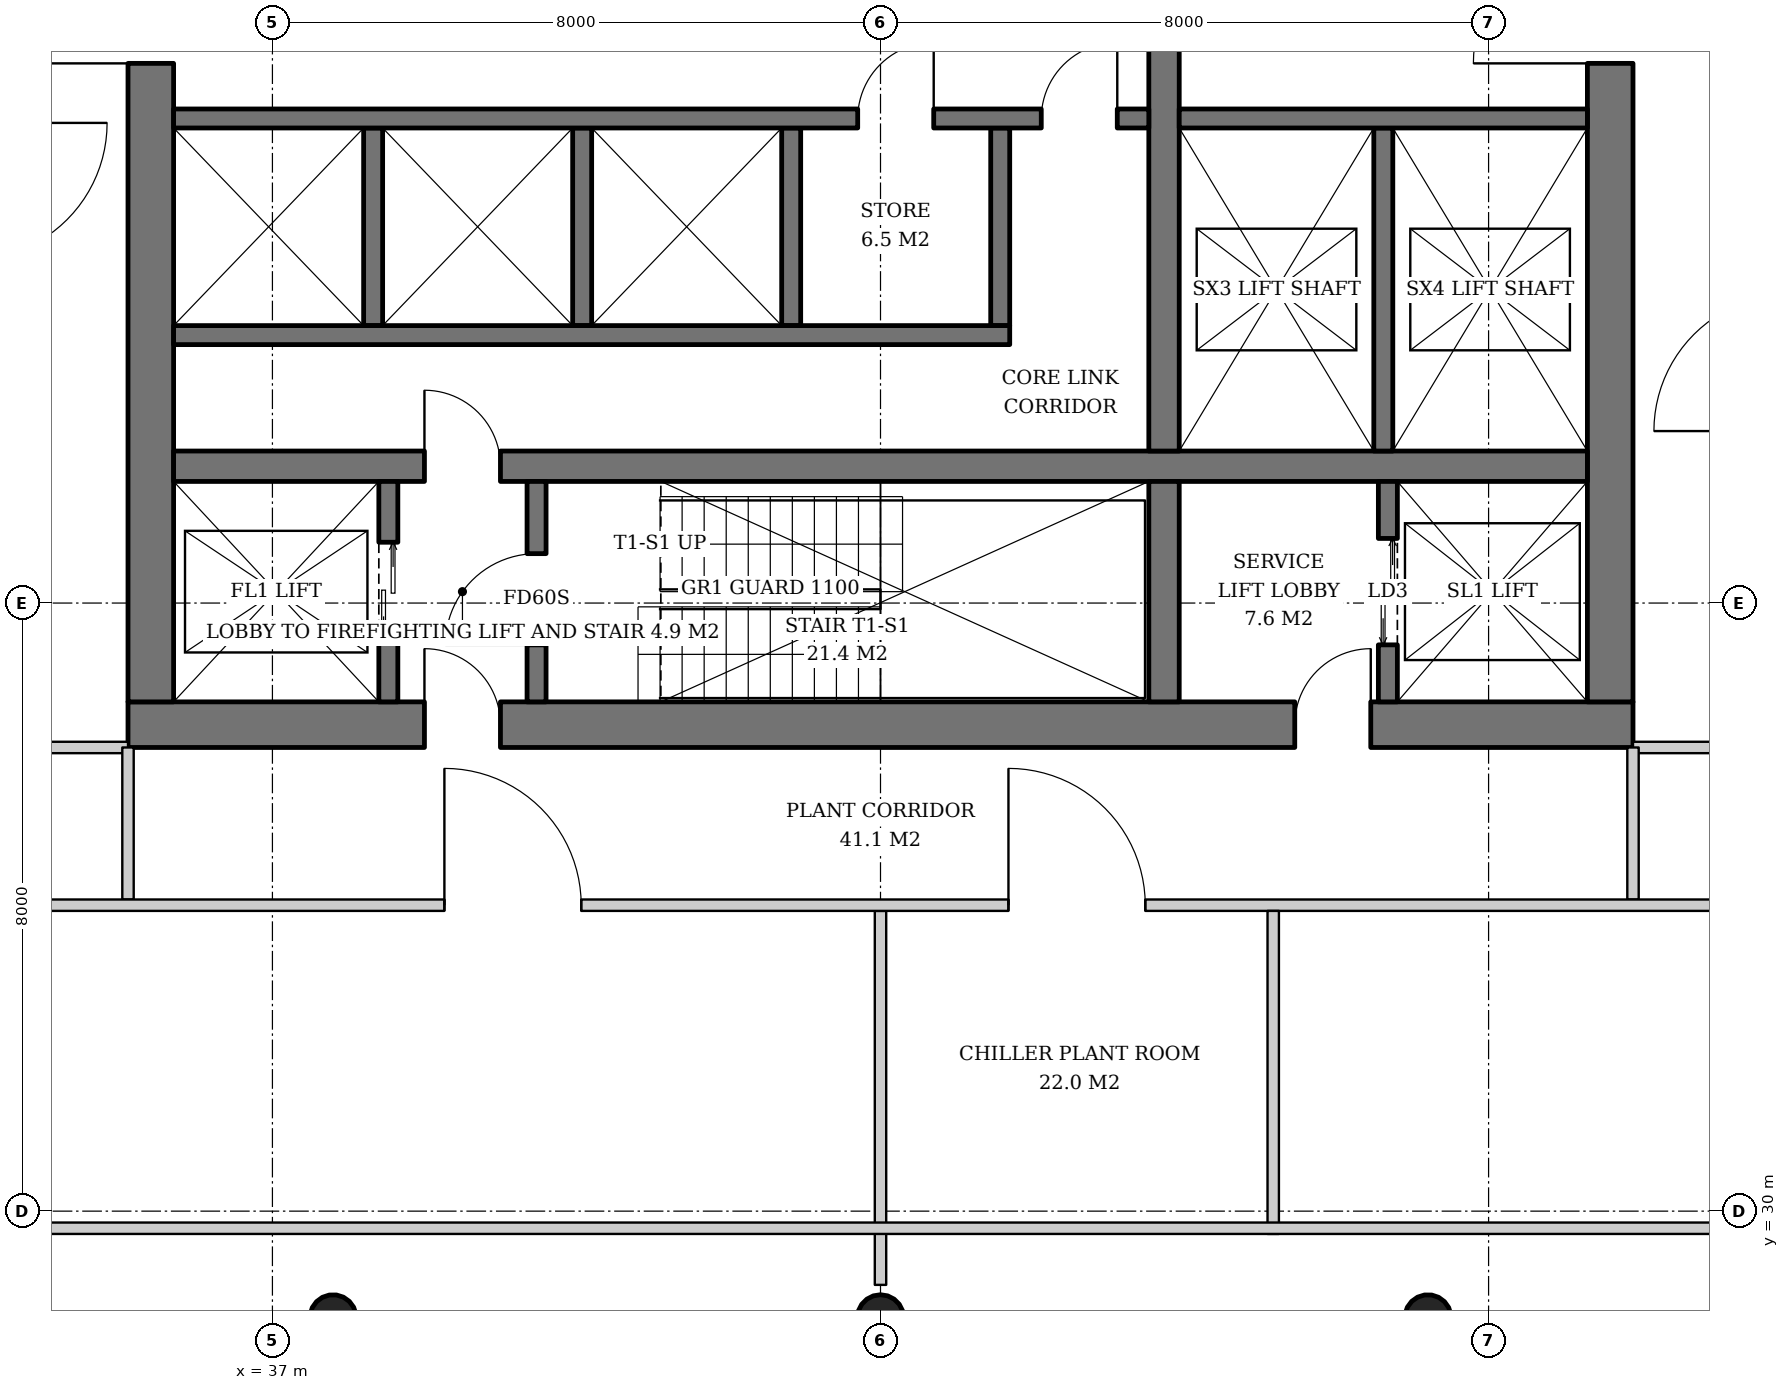
"""IFC4 building model, lengths in metres.
Left out: names, types, materials, properties, quantities, classifications, styles, units other than length and angle.
Written with IfcOpenShell. Run it as: python <this file> out.ifc"""

import sys

from ifc_helpers import new_model, si_unit, direction, frame, frame_2d, origin, origin_2d, place, context, subcontext, project, spatial, rectangle, hollow_circle, extrude, element, fill, save


model = new_model("IFC4")
c1 = context("Model", 3, precision=1e-05, world=origin(), true_north=direction((0.0, 1.0)))
c2 = subcontext(c1, "Body", "Model", "MODEL_VIEW")
j1 = project(units=[si_unit("LENGTHUNIT", "METRE"), si_unit("PLANEANGLEUNIT", "RADIAN")], contexts=[c1])
p1 = place(None, origin())
s1 = spatial("IfcSite", under=j1, at=p1, CompositionType="ELEMENT")
p2 = place(p1, origin())
s2 = spatial("IfcBuilding", under=s1, at=p2, CompositionType="ELEMENT")
p3 = place(p2, frame((0.0, 0.0, 226.2)))
s3 = spatial("IfcBuildingStorey", under=s2, at=p3, CompositionType="ELEMENT", Elevation=226.2)
p4 = place(p3, frame((37.779, 28.557, 0.0), z_axis=(0.015987237665, 0.031910269556, 0.999362868496), x_axis=(-0.894067115991, 0.447933021895, 0.0)))
e1 = element("IfcColumn", 1, at=p4, inside=s3, PredefinedType="COLUMN", context=c2, shape_type="SweptSolid", body=[
    extrude(hollow_circle(Radius=0.305, WallThickness=0.025, at=origin_2d()), origin(), (0.0, 0.0, 1.0), 3.802),
])
p5 = place(p3, frame((45.0, 28.557, 0.0), z_axis=(0.0, 0.031914348339, 0.999490607445), x_axis=(-1.0, 0.0, 0.0)))
e2 = element("IfcColumn", 2, at=p5, inside=s3, PredefinedType="COLUMN", context=c2, shape_type="SweptSolid", body=[
    extrude(hollow_circle(Radius=0.305, WallThickness=0.025, at=origin_2d()), origin(), (0.0, 0.0, 1.0), 3.802),
])
p6 = place(p3, frame((52.221, 28.557, 0.0), z_axis=(-0.015987237665, 0.031910269556, 0.999362868496), x_axis=(-0.894067115991, -0.447933021895, 0.0)))
e3 = element("IfcColumn", 3, at=p6, inside=s3, PredefinedType="COLUMN", context=c2, shape_type="SweptSolid", body=[
    extrude(hollow_circle(Radius=0.305, WallThickness=0.025, at=origin_2d()), origin(), (0.0, 0.0, 1.0), 3.802),
])
p7 = place(p3, frame((35.1, 36.4, 0.0), z_axis=(0.0, 0.0, 1.0), x_axis=(1.0, 0.0, 0.0)))
e4 = element("IfcWall", 4, at=p7, inside=s3, PredefinedType="SHEAR", context=c2, shape_type="SweptSolid", body=[
    extrude(rectangle(XDim=19.8, YDim=0.6, at=frame_2d((9.9, 0.0))), origin(), (0.0, 0.0, 1.0), 3.8),
])
p8 = place(p7, frame((3.9, 0.0, 0.0)))
e5 = element("IfcOpeningElement", 5, at=p8, cuts=e4, PredefinedType="OPENING", context=c2, shape_type="SweptSolid", body=[
    extrude(rectangle(XDim=1.0, YDim=2.1, at=frame_2d((0.5, 1.05))), frame((0.0, 0.31, 0.0), z_axis=(0.0, -1.0, 0.0), x_axis=(1.0, 0.0, 0.0)), (0.0, 0.0, 1.0), 0.62),
])
p9 = place(p7, frame((15.35, 0.0, 0.0)))
e6 = element("IfcOpeningElement", 6, at=p9, cuts=e4, PredefinedType="OPENING", context=c2, shape_type="SweptSolid", body=[
    extrude(rectangle(XDim=1.0, YDim=2.1, at=frame_2d((0.5, 1.05))), frame((0.0, 0.31, 0.0), z_axis=(0.0, -1.0, 0.0), x_axis=(1.0, 0.0, 0.0)), (0.0, 0.0, 1.0), 0.62),
])
p10 = place(p3, frame((35.4, 36.7, 0.0), z_axis=(0.0, 0.0, 1.0), x_axis=(0.0, 1.0, 0.0)))
e7 = element("IfcWall", 7, at=p10, inside=s3, PredefinedType="SHEAR", context=c2, shape_type="SweptSolid", body=[
    extrude(rectangle(XDim=18.6, YDim=0.6, at=frame_2d((9.3, 0.0))), origin(), (0.0, 0.0, 1.0), 3.8),
])
p11 = place(p10, frame((8.4, 0.0, 0.0)))
e8 = element("IfcOpeningElement", 8, at=p11, cuts=e7, PredefinedType="OPENING", context=c2, shape_type="SweptSolid", body=[
    extrude(rectangle(XDim=1.8, YDim=2.4, at=frame_2d((0.9, 1.2))), frame((0.0, 0.31, 0.0), z_axis=(0.0, -1.0, 0.0), x_axis=(1.0, 0.0, 0.0)), (0.0, 0.0, 1.0), 0.62),
])
p12 = place(p3, frame((54.6, 36.7, 0.0), z_axis=(0.0, 0.0, 1.0), x_axis=(0.0, 1.0, 0.0)))
e9 = element("IfcWall", 9, at=p12, inside=s3, PredefinedType="SHEAR", context=c2, shape_type="SweptSolid", body=[
    extrude(rectangle(XDim=18.6, YDim=0.6, at=frame_2d((9.3, 0.0))), origin(), (0.0, 0.0, 1.0), 3.8),
])
p13 = place(p12, frame((8.4, 0.0, 0.0)))
e10 = element("IfcOpeningElement", 10, at=p13, cuts=e9, PredefinedType="OPENING", context=c2, shape_type="SweptSolid", body=[
    extrude(rectangle(XDim=1.8, YDim=2.4, at=frame_2d((0.9, 1.2))), frame((0.0, 0.31, 0.0), z_axis=(0.0, -1.0, 0.0), x_axis=(1.0, 0.0, 0.0)), (0.0, 0.0, 1.0), 0.62),
])
p14 = place(p3, frame((35.7, 39.8, 0.0), z_axis=(0.0, 0.0, 1.0), x_axis=(1.0, 0.0, 0.0)))
e11 = element("IfcWall", 11, at=p14, inside=s3, PredefinedType="SHEAR", context=c2, shape_type="SweptSolid", body=[
    extrude(rectangle(XDim=18.6, YDim=0.4, at=frame_2d((9.3, 0.0))), origin(), (0.0, 0.0, 1.0), 3.8),
])
p15 = place(p14, frame((3.3, 0.0, 0.0)))
e12 = element("IfcOpeningElement", 12, at=p15, cuts=e11, PredefinedType="OPENING", context=c2, shape_type="SweptSolid", body=[
    extrude(rectangle(XDim=1.0, YDim=2.1, at=frame_2d((0.5, 1.05))), frame((0.0, 0.21, 0.0), z_axis=(0.0, -1.0, 0.0), x_axis=(1.0, 0.0, 0.0)), (0.0, 0.0, 1.0), 0.42),
])
p16 = place(p3, frame((48.73, 36.7, 0.0), z_axis=(0.0, 0.0, 1.0), x_axis=(0.0, 1.0, 0.0)))
e13 = element("IfcWall", 13, at=p16, inside=s3, PredefinedType="SHEAR", context=c2, shape_type="SweptSolid", body=[
    extrude(rectangle(XDim=2.9, YDim=0.4, at=frame_2d((1.45, 0.0))), origin(), (0.0, 0.0, 1.0), 3.8),
])
p17 = place(p3, frame((48.73, 40.0, 0.0), z_axis=(0.0, 0.0, 1.0), x_axis=(0.0, 1.0, 0.0)))
e14 = element("IfcWall", 14, at=p17, inside=s3, PredefinedType="SHEAR", context=c2, shape_type="SweptSolid", body=[
    extrude(rectangle(XDim=12.0, YDim=0.4, at=frame_2d((6.0, 0.0))), origin(), (0.0, 0.0, 1.0), 3.8),
])
p18 = place(p17, frame((5.5, 0.0, 0.0)))
e15 = element("IfcOpeningElement", 15, at=p18, cuts=e14, PredefinedType="OPENING", context=c2, shape_type="SweptSolid", body=[
    extrude(rectangle(XDim=1.0, YDim=2.1, at=frame_2d((0.5, 1.05))), frame((0.0, 0.21, 0.0), z_axis=(0.0, -1.0, 0.0), x_axis=(1.0, 0.0, 0.0)), (0.0, 0.0, 1.0), 0.42),
])
p19 = place(p3, frame((38.525, 36.7, 0.0), z_axis=(0.0, 0.0, 1.0), x_axis=(0.0, 1.0, 0.0)))
e16 = element("IfcWall", 16, at=p19, inside=s3, PredefinedType="SHEAR", context=c2, shape_type="SweptSolid", body=[
    extrude(rectangle(XDim=2.9, YDim=0.25, at=frame_2d((1.45, 0.0))), origin(), (0.0, 0.0, 1.0), 3.8),
])
p20 = place(p19, frame((0.8, 0.0, 0.0)))
e17 = element("IfcOpeningElement", 17, at=p20, cuts=e16, PredefinedType="OPENING", context=c2, shape_type="SweptSolid", body=[
    extrude(rectangle(XDim=1.3, YDim=2.2, at=frame_2d((0.65, 1.1))), frame((0.0, 0.135, 0.0), z_axis=(0.0, -1.0, 0.0), x_axis=(1.0, 0.0, 0.0)), (0.0, 0.0, 1.0), 0.27),
])
p21 = place(p3, frame((40.475, 36.7, 0.0), z_axis=(0.0, 0.0, 1.0), x_axis=(0.0, 1.0, 0.0)))
e18 = element("IfcWall", 18, at=p21, inside=s3, PredefinedType="SHEAR", context=c2, shape_type="SweptSolid", body=[
    extrude(rectangle(XDim=2.9, YDim=0.25, at=frame_2d((1.45, 0.0))), origin(), (0.0, 0.0, 1.0), 3.8),
])
p22 = place(p21, frame((0.75, 0.0, 0.0)))
e19 = element("IfcOpeningElement", 19, at=p22, cuts=e18, PredefinedType="OPENING", context=c2, shape_type="SweptSolid", body=[
    extrude(rectangle(XDim=1.2, YDim=2.1, at=frame_2d((0.6, 1.05))), frame((0.0, 0.135, 0.0), z_axis=(0.0, -1.0, 0.0), x_axis=(1.0, 0.0, 0.0)), (0.0, 0.0, 1.0), 0.27),
])
p23 = place(p3, frame((51.675, 36.7, 0.0), z_axis=(0.0, 0.0, 1.0), x_axis=(0.0, 1.0, 0.0)))
e20 = element("IfcWall", 20, at=p23, inside=s3, PredefinedType="SHEAR", context=c2, shape_type="SweptSolid", body=[
    extrude(rectangle(XDim=2.9, YDim=0.25, at=frame_2d((1.45, 0.0))), origin(), (0.0, 0.0, 1.0), 3.8),
])
p24 = place(p23, frame((0.75, 0.0, 0.0)))
e21 = element("IfcOpeningElement", 21, at=p24, cuts=e20, PredefinedType="OPENING", context=c2, shape_type="SweptSolid", body=[
    extrude(rectangle(XDim=1.4, YDim=2.4, at=frame_2d((0.7, 1.2))), frame((0.0, 0.135, 0.0), z_axis=(0.0, -1.0, 0.0), x_axis=(1.0, 0.0, 0.0)), (0.0, 0.0, 1.0), 0.27),
])
for number, where, z_axis, x_axis in (
    (22, (38.325, 44.25, 0.0), (0.0, 0.0, 1.0), (0.0, -1.0, 0.0)),
    (23, (41.075, 44.25, 0.0), (0.0, 0.0, 1.0), (0.0, -1.0, 0.0)),
    (24, (43.825, 44.25, 0.0), (0.0, 0.0, 1.0), (0.0, -1.0, 0.0)),
    (25, (46.575, 44.25, 0.0), (0.0, 0.0, 1.0), (0.0, -1.0, 0.0)),
):
    element("IfcWall", number, at=place(p3, frame(where, z_axis=z_axis, x_axis=x_axis)), inside=s3, PredefinedType="SHEAR", context=c2, shape_type="SweptSolid", body=[
        extrude(rectangle(XDim=2.6, YDim=0.25, at=frame_2d((1.3, 0.0))), origin(), (0.0, 0.0, 1.0), 3.8),
    ])
p25 = place(p3, frame((35.7, 41.525, 0.0), z_axis=(0.0, 0.0, 1.0), x_axis=(1.0, 0.0, 0.0)))
e26 = element("IfcWall", 26, at=p25, inside=s3, PredefinedType="SHEAR", context=c2, shape_type="SweptSolid", body=[
    extrude(rectangle(XDim=11.0, YDim=0.25, at=frame_2d((5.5, 0.0))), origin(), (0.0, 0.0, 1.0), 3.8),
])
p26 = place(p3, frame((35.7, 44.375, 0.0), z_axis=(0.0, 0.0, 1.0), x_axis=(1.0, 0.0, 0.0)))
e27 = element("IfcWall", 27, at=p26, inside=s3, PredefinedType="SHEAR", context=c2, shape_type="SweptSolid", body=[
    extrude(rectangle(XDim=12.83, YDim=0.25, at=frame_2d((6.415, 0.0))), origin(), (0.0, 0.0, 1.0), 3.8),
])
p27 = place(p26, frame((9.0, 0.0, 0.0)))
e28 = element("IfcOpeningElement", 28, at=p27, cuts=e27, PredefinedType="OPENING", context=c2, shape_type="SweptSolid", body=[
    extrude(rectangle(XDim=1.0, YDim=2.1, at=frame_2d((0.5, 1.05))), frame((0.0, 0.135, 0.0), z_axis=(0.0, -1.0, 0.0), x_axis=(1.0, 0.0, 0.0)), (0.0, 0.0, 1.0), 0.27),
])
p28 = place(p26, frame((11.415, 0.0, 0.0)))
e29 = element("IfcOpeningElement", 29, at=p28, cuts=e27, PredefinedType="OPENING", context=c2, shape_type="SweptSolid", body=[
    extrude(rectangle(XDim=1.0, YDim=2.1, at=frame_2d((0.5, 1.05))), frame((0.0, 0.135, 0.0), z_axis=(0.0, -1.0, 0.0), x_axis=(1.0, 0.0, 0.0)), (0.0, 0.0, 1.0), 0.27),
])
p29 = place(p3, frame((51.615, 44.25, 0.0), z_axis=(0.0, 0.0, 1.0), x_axis=(0.0, -1.0, 0.0)))
e30 = element("IfcWall", 30, at=p29, inside=s3, PredefinedType="SHEAR", context=c2, shape_type="SweptSolid", body=[
    extrude(rectangle(XDim=4.25, YDim=0.25, at=frame_2d((2.125, 0.0))), origin(), (0.0, 0.0, 1.0), 3.8),
])
p30 = place(p3, frame((48.93, 44.375, 0.0), z_axis=(0.0, 0.0, 1.0), x_axis=(1.0, 0.0, 0.0)))
e31 = element("IfcWall", 31, at=p30, inside=s3, PredefinedType="SHEAR", context=c2, shape_type="SweptSolid", body=[
    extrude(rectangle(XDim=5.37, YDim=0.25, at=frame_2d((2.685, 0.0))), origin(), (0.0, 0.0, 1.0), 3.8),
])
for number, where, z_axis, x_axis in (
    (32, (54.9, 36.1, 0.0), (0.0, 0.0, 1.0), (1.0, 0.0, 0.0)),
    (33, (35.1, 36.1, 0.0), (0.0, 0.0, 1.0), (-1.0, 0.0, 0.0)),
    (34, (54.9, 36.1, 0.0), (0.0, 0.0, 1.0), (0.0, -1.0, 0.0)),
    (35, (35.1, 36.1, 0.0), (0.0, 0.0, 1.0), (0.0, -1.0, 0.0)),
):
    element("IfcWall", number, at=place(p3, frame(where, z_axis=z_axis, x_axis=x_axis)), inside=s3, PredefinedType="PARTITIONING", context=c2, shape_type="SweptSolid", body=[
        extrude(rectangle(XDim=2.0, YDim=0.15, at=frame_2d((1.0, 0.0))), origin(), (0.0, 0.0, 1.0), 3.52),
    ])
p31 = place(p3, frame((45.0, 33.95, 0.0), z_axis=(0.0, 0.0, 1.0), x_axis=(0.0, -1.0, 0.0)))
e36 = element("IfcWall", 36, at=p31, inside=s3, PredefinedType="SOLIDWALL", context=c2, shape_type="SweptSolid", body=[
    extrude(rectangle(XDim=4.92, YDim=0.15, at=frame_2d((2.46, 0.0))), origin(), (0.0, 0.0, 1.0), 3.52),
])
p32 = place(p3, frame((32.95, 34.025, 0.0), z_axis=(0.0, 0.0, 1.0), x_axis=(1.0, 0.0, 0.0)))
e37 = element("IfcWall", 37, at=p32, inside=s3, PredefinedType="SOLIDWALL", context=c2, shape_type="SweptSolid", body=[
    extrude(rectangle(XDim=23.95, YDim=0.15, at=frame_2d((11.975, 0.0))), origin(), (0.0, 0.0, 1.0), 2.706),
])
p33 = place(p32, frame((6.312, 0.0, 0.0)))
e38 = element("IfcOpeningElement", 38, at=p33, cuts=e37, PredefinedType="OPENING", context=c2, shape_type="SweptSolid", body=[
    extrude(rectangle(XDim=1.8, YDim=2.4, at=frame_2d((0.9, 1.2))), frame((0.0, 0.085, 0.0), z_axis=(0.0, -1.0, 0.0), x_axis=(1.0, 0.0, 0.0)), (0.0, 0.0, 1.0), 0.17),
])
p34 = place(p32, frame((13.733, 0.0, 0.0)))
e39 = element("IfcOpeningElement", 39, at=p34, cuts=e37, PredefinedType="OPENING", context=c2, shape_type="SweptSolid", body=[
    extrude(rectangle(XDim=1.8, YDim=2.4, at=frame_2d((0.9, 1.2))), frame((0.0, 0.085, 0.0), z_axis=(0.0, -1.0, 0.0), x_axis=(1.0, 0.0, 0.0)), (0.0, 0.0, 1.0), 0.17),
])
p35 = place(p3, frame((50.167, 33.95, 0.0), z_axis=(0.0, 0.0, 1.0), x_axis=(0.0, -1.0, 0.0)))
e40 = element("IfcWall", 40, at=p35, inside=s3, PredefinedType="SOLIDWALL", context=c2, shape_type="SweptSolid", body=[
    extrude(rectangle(XDim=4.25, YDim=0.15, at=frame_2d((2.125, 0.0))), origin(), (0.0, 0.0, 1.0), 3.52),
])
p36 = place(p3, frame((58.3, 29.775, 0.0), z_axis=(0.0, 0.0, 1.0), x_axis=(-1.0, 0.0, 0.0)))
e41 = element("IfcWall", 41, at=p36, inside=s3, PredefinedType="PARTITIONING", context=c2, shape_type="SweptSolid", body=[
    extrude(rectangle(XDim=26.6, YDim=0.15, at=frame_2d((13.3, 0.0))), origin(), (0.0, 0.0, 1.0), 2.706),
])
p37 = place(p20, origin())
e42 = element("IfcDoor", 42, at=p37, inside=s3, OperationType="DOUBLE_DOOR_SLIDING", PredefinedType="DOOR", context=c2, shape_type="SweptSolid", body=[
    extrude(rectangle(XDim=1.3, YDim=2.2, at=frame_2d((0.65, 1.1))), frame((0.0, 0.025, 0.0), z_axis=(0.0, -1.0, 0.0), x_axis=(1.0, 0.0, 0.0)), (0.0, 0.0, 1.0), 0.05),
])
fill(e17, e42)
p38 = place(p22, origin())
e43 = element("IfcDoor", 43, at=p38, inside=s3, OperationType="SINGLE_SWING_LEFT", PredefinedType="DOOR", context=c2, shape_type="SweptSolid", body=[
    extrude(rectangle(XDim=1.2, YDim=2.1, at=frame_2d((0.6, 1.05))), frame((0.0, 0.025, 0.0), z_axis=(0.0, -1.0, 0.0), x_axis=(1.0, 0.0, 0.0)), (0.0, 0.0, 1.0), 0.05),
])
fill(e19, e43)
p39 = place(p24, origin())
e44 = element("IfcDoor", 44, at=p39, inside=s3, OperationType="DOUBLE_DOOR_SLIDING", PredefinedType="DOOR", context=c2, shape_type="SweptSolid", body=[
    extrude(rectangle(XDim=1.4, YDim=2.4, at=frame_2d((0.7, 1.2))), frame((0.0, 0.025, 0.0), z_axis=(0.0, -1.0, 0.0), x_axis=(1.0, 0.0, 0.0)), (0.0, 0.0, 1.0), 0.05),
])
fill(e21, e44)
p40 = place(p27, origin())
e45 = element("IfcDoor", 45, at=p40, inside=s3, OperationType="SINGLE_SWING_RIGHT", PredefinedType="DOOR", context=c2, shape_type="SweptSolid", body=[
    extrude(rectangle(XDim=1.0, YDim=2.1, at=frame_2d((0.5, 1.05))), frame((0.0, 0.025, 0.0), z_axis=(0.0, -1.0, 0.0), x_axis=(1.0, 0.0, 0.0)), (0.0, 0.0, 1.0), 0.05),
])
fill(e28, e45)
p41 = place(p28, origin())
e46 = element("IfcDoor", 46, at=p41, inside=s3, OperationType="SINGLE_SWING_RIGHT", PredefinedType="DOOR", context=c2, shape_type="SweptSolid", body=[
    extrude(rectangle(XDim=1.0, YDim=2.1, at=frame_2d((0.5, 1.05))), frame((0.0, 0.025, 0.0), z_axis=(0.0, -1.0, 0.0), x_axis=(1.0, 0.0, 0.0)), (0.0, 0.0, 1.0), 0.05),
])
fill(e29, e46)
p42 = place(p8, origin())
e47 = element("IfcDoor", 47, at=p42, inside=s3, OperationType="SINGLE_SWING_LEFT", PredefinedType="DOOR", context=c2, shape_type="SweptSolid", body=[
    extrude(rectangle(XDim=1.0, YDim=2.1, at=frame_2d((0.5, 1.05))), frame((0.0, 0.025, 0.0), z_axis=(0.0, -1.0, 0.0), x_axis=(1.0, 0.0, 0.0)), (0.0, 0.0, 1.0), 0.05),
])
fill(e5, e47)
p43 = place(p11, origin())
e48 = element("IfcDoor", 48, at=p43, inside=s3, OperationType="DOUBLE_DOOR_SINGLE_SWING", PredefinedType="DOOR", context=c2, shape_type="SweptSolid", body=[
    extrude(rectangle(XDim=1.8, YDim=2.4, at=frame_2d((0.9, 1.2))), frame((0.0, 0.025, 0.0), z_axis=(0.0, -1.0, 0.0), x_axis=(1.0, 0.0, 0.0)), (0.0, 0.0, 1.0), 0.05),
])
fill(e8, e48)
p44 = place(p13, origin())
e49 = element("IfcDoor", 49, at=p44, inside=s3, OperationType="DOUBLE_DOOR_SINGLE_SWING", PredefinedType="DOOR", context=c2, shape_type="SweptSolid", body=[
    extrude(rectangle(XDim=1.8, YDim=2.4, at=frame_2d((0.9, 1.2))), frame((0.0, 0.025, 0.0), z_axis=(0.0, -1.0, 0.0), x_axis=(1.0, 0.0, 0.0)), (0.0, 0.0, 1.0), 0.05),
])
fill(e10, e49)
p45 = place(p9, origin())
e50 = element("IfcDoor", 50, at=p45, inside=s3, OperationType="SINGLE_SWING_RIGHT", PredefinedType="DOOR", context=c2, shape_type="SweptSolid", body=[
    extrude(rectangle(XDim=1.0, YDim=2.1, at=frame_2d((0.5, 1.05))), frame((0.0, 0.025, 0.0), z_axis=(0.0, -1.0, 0.0), x_axis=(1.0, 0.0, 0.0)), (0.0, 0.0, 1.0), 0.05),
])
fill(e6, e50)
p46 = place(p15, origin())
e51 = element("IfcDoor", 51, at=p46, inside=s3, OperationType="SINGLE_SWING_LEFT", PredefinedType="DOOR", context=c2, shape_type="SweptSolid", body=[
    extrude(rectangle(XDim=1.0, YDim=2.1, at=frame_2d((0.5, 1.05))), frame((0.0, 0.025, 0.0), z_axis=(0.0, -1.0, 0.0), x_axis=(1.0, 0.0, 0.0)), (0.0, 0.0, 1.0), 0.05),
])
fill(e12, e51)
p47 = place(p33, origin())
e52 = element("IfcDoor", 52, at=p47, inside=s3, OperationType="DOUBLE_DOOR_SINGLE_SWING", PredefinedType="DOOR", context=c2, shape_type="SweptSolid", body=[
    extrude(rectangle(XDim=1.8, YDim=2.4, at=frame_2d((0.9, 1.2))), frame((0.0, 0.025, 0.0), z_axis=(0.0, -1.0, 0.0), x_axis=(1.0, 0.0, 0.0)), (0.0, 0.0, 1.0), 0.05),
])
fill(e38, e52)
p48 = place(p34, origin())
e53 = element("IfcDoor", 53, at=p48, inside=s3, OperationType="DOUBLE_DOOR_SINGLE_SWING", PredefinedType="DOOR", context=c2, shape_type="SweptSolid", body=[
    extrude(rectangle(XDim=1.8, YDim=2.4, at=frame_2d((0.9, 1.2))), frame((0.0, 0.025, 0.0), z_axis=(0.0, -1.0, 0.0), x_axis=(1.0, 0.0, 0.0)), (0.0, 0.0, 1.0), 0.05),
])
fill(e39, e53)
save(model, sys.argv[1])
